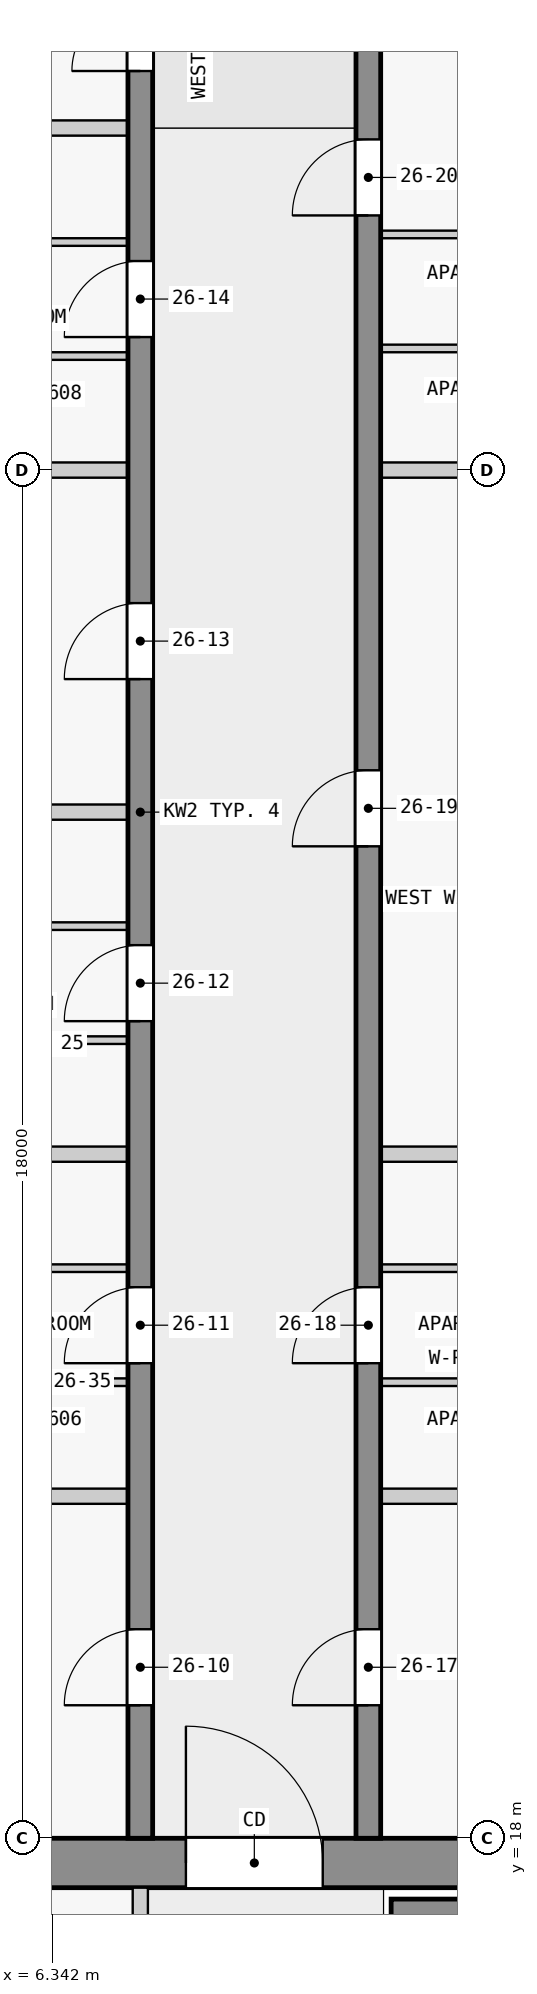
"""IFC4 building model, lengths in metres.
Left out: names, types, materials, properties, quantities, classifications, styles, units other than length and angle.
Written with IfcOpenShell. Run it as: python <this file> out.ifc"""

import sys

from ifc_helpers import new_model, si_unit, direction, frame, frame_2d, origin, place, context, subcontext, project, spatial, rectangle, extrude, element, fill, save


model = new_model("IFC4")
c1 = context("Model", 3, precision=1e-05, world=origin(), true_north=direction((0.0, 1.0)))
c2 = subcontext(c1, "Body", "Model", "MODEL_VIEW")
j1 = project(units=[si_unit("LENGTHUNIT", "METRE"), si_unit("PLANEANGLEUNIT", "RADIAN")], contexts=[c1])
p1 = place(None, origin())
s1 = spatial("IfcSite", under=j1, at=p1, CompositionType="ELEMENT")
p2 = place(p1, origin())
s2 = spatial("IfcBuilding", under=s1, at=p2, CompositionType="ELEMENT")
p3 = place(p2, frame((0.0, 0.0, 102.8)))
s3 = spatial("IfcBuildingStorey", under=s2, at=p3, CompositionType="ELEMENT", Elevation=102.8)
p4 = place(p3, frame((1.65, 17.675, 0.0), z_axis=(0.0, 0.0, 1.0), x_axis=(1.0, 0.0, 0.0)))
e1 = element("IfcWall", 1, at=p4, inside=s3, PredefinedType="SHEAR", context=c2, shape_type="SweptSolid", body=[
    extrude(rectangle(XDim=20.85, YDim=0.65, at=frame_2d((10.425, 0.0))), origin(), (0.0, 0.0, 1.0), 3.25),
])
p5 = place(p4, frame((6.45, 0.0, 0.0)))
e2 = element("IfcOpeningElement", 2, at=p5, cuts=e1, PredefinedType="OPENING", context=c2, shape_type="SweptSolid", body=[
    extrude(rectangle(XDim=1.8, YDim=2.1, at=frame_2d((0.9, 1.05))), frame((0.0, 0.335, 0.0), z_axis=(0.0, -1.0, 0.0), x_axis=(1.0, 0.0, 0.0)), (0.0, 0.0, 1.0), 0.67),
])
p6 = place(p3, frame((10.8, 17.05, 0.0), z_axis=(0.0, 0.0, 1.0), x_axis=(1.0, 0.0, 0.0)))
e3 = element("IfcWall", 3, at=p6, inside=s3, PredefinedType="SHEAR", context=c2, shape_type="SweptSolid", body=[
    extrude(rectangle(XDim=7.8, YDim=0.3, at=frame_2d((3.9, 0.0))), origin(), (0.0, 0.0, 1.0), 3.25),
])
p7 = place(p3, frame((7.5, 18.0, 0.0), z_axis=(0.0, 0.0, 1.0), x_axis=(0.0, 1.0, 0.0)))
e4 = element("IfcWall", 4, at=p7, inside=s3, PredefinedType="SHEAR", context=c2, shape_type="SweptSolid", body=[
    extrude(rectangle(XDim=27.0, YDim=0.325, at=frame_2d((13.5, 0.0))), origin(), (0.0, 0.0, 1.0), 3.25),
])
p8 = place(p7, frame((1.75, 0.0, 0.0)))
e5 = element("IfcOpeningElement", 5, at=p8, cuts=e4, PredefinedType="OPENING", context=c2, shape_type="SweptSolid", body=[
    extrude(rectangle(XDim=1.0, YDim=2.1, at=frame_2d((0.5, 1.05))), frame((0.0, 0.172, 0.0), z_axis=(0.0, -1.0, 0.0), x_axis=(1.0, 0.0, 0.0)), (0.0, 0.0, 1.0), 0.345),
])
p9 = place(p7, frame((6.25, 0.0, 0.0)))
e6 = element("IfcOpeningElement", 6, at=p9, cuts=e4, PredefinedType="OPENING", context=c2, shape_type="SweptSolid", body=[
    extrude(rectangle(XDim=1.0, YDim=2.1, at=frame_2d((0.5, 1.05))), frame((0.0, 0.172, 0.0), z_axis=(0.0, -1.0, 0.0), x_axis=(1.0, 0.0, 0.0)), (0.0, 0.0, 1.0), 0.345),
])
p10 = place(p7, frame((10.75, 0.0, 0.0)))
e7 = element("IfcOpeningElement", 7, at=p10, cuts=e4, PredefinedType="OPENING", context=c2, shape_type="SweptSolid", body=[
    extrude(rectangle(XDim=1.0, YDim=2.1, at=frame_2d((0.5, 1.05))), frame((0.0, 0.172, 0.0), z_axis=(0.0, -1.0, 0.0), x_axis=(1.0, 0.0, 0.0)), (0.0, 0.0, 1.0), 0.345),
])
p11 = place(p7, frame((15.25, 0.0, 0.0)))
e8 = element("IfcOpeningElement", 8, at=p11, cuts=e4, PredefinedType="OPENING", context=c2, shape_type="SweptSolid", body=[
    extrude(rectangle(XDim=1.0, YDim=2.1, at=frame_2d((0.5, 1.05))), frame((0.0, 0.172, 0.0), z_axis=(0.0, -1.0, 0.0), x_axis=(1.0, 0.0, 0.0)), (0.0, 0.0, 1.0), 0.345),
])
p12 = place(p7, frame((19.75, 0.0, 0.0)))
e9 = element("IfcOpeningElement", 9, at=p12, cuts=e4, PredefinedType="OPENING", context=c2, shape_type="SweptSolid", body=[
    extrude(rectangle(XDim=1.0, YDim=2.1, at=frame_2d((0.5, 1.05))), frame((0.0, 0.172, 0.0), z_axis=(0.0, -1.0, 0.0), x_axis=(1.0, 0.0, 0.0)), (0.0, 0.0, 1.0), 0.345),
])
p13 = place(p7, frame((23.25, 0.0, 0.0)))
e10 = element("IfcOpeningElement", 10, at=p13, cuts=e4, PredefinedType="OPENING", context=c2, shape_type="SweptSolid", body=[
    extrude(rectangle(XDim=0.9, YDim=2.1, at=frame_2d((0.45, 1.05))), frame((0.0, 0.172, 0.0), z_axis=(0.0, -1.0, 0.0), x_axis=(1.0, 0.0, 0.0)), (0.0, 0.0, 1.0), 0.345),
])
p14 = place(p7, frame((25.45, 0.0, 0.0)))
e11 = element("IfcOpeningElement", 11, at=p14, cuts=e4, PredefinedType="OPENING", context=c2, shape_type="SweptSolid", body=[
    extrude(rectangle(XDim=1.0, YDim=2.1, at=frame_2d((0.5, 1.05))), frame((0.0, 0.172, 0.0), z_axis=(0.0, -1.0, 0.0), x_axis=(1.0, 0.0, 0.0)), (0.0, 0.0, 1.0), 0.345),
])
p15 = place(p3, frame((10.5, 18.0, 0.0), z_axis=(0.0, 0.0, 1.0), x_axis=(0.0, 1.0, 0.0)))
e12 = element("IfcWall", 12, at=p15, inside=s3, PredefinedType="SHEAR", context=c2, shape_type="SweptSolid", body=[
    extrude(rectangle(XDim=27.0, YDim=0.325, at=frame_2d((13.5, 0.0))), origin(), (0.0, 0.0, 1.0), 3.25),
])
p16 = place(p15, frame((1.75, 0.0, 0.0)))
e13 = element("IfcOpeningElement", 13, at=p16, cuts=e12, PredefinedType="OPENING", context=c2, shape_type="SweptSolid", body=[
    extrude(rectangle(XDim=1.0, YDim=2.1, at=frame_2d((0.5, 1.05))), frame((0.0, 0.172, 0.0), z_axis=(0.0, -1.0, 0.0), x_axis=(1.0, 0.0, 0.0)), (0.0, 0.0, 1.0), 0.345),
])
p17 = place(p15, frame((6.25, 0.0, 0.0)))
e14 = element("IfcOpeningElement", 14, at=p17, cuts=e12, PredefinedType="OPENING", context=c2, shape_type="SweptSolid", body=[
    extrude(rectangle(XDim=1.0, YDim=2.1, at=frame_2d((0.5, 1.05))), frame((0.0, 0.172, 0.0), z_axis=(0.0, -1.0, 0.0), x_axis=(1.0, 0.0, 0.0)), (0.0, 0.0, 1.0), 0.345),
])
p18 = place(p15, frame((13.05, 0.0, 0.0)))
e15 = element("IfcOpeningElement", 15, at=p18, cuts=e12, PredefinedType="OPENING", context=c2, shape_type="SweptSolid", body=[
    extrude(rectangle(XDim=1.0, YDim=2.1, at=frame_2d((0.5, 1.05))), frame((0.0, 0.172, 0.0), z_axis=(0.0, -1.0, 0.0), x_axis=(1.0, 0.0, 0.0)), (0.0, 0.0, 1.0), 0.345),
])
p19 = place(p15, frame((21.35, 0.0, 0.0)))
e16 = element("IfcOpeningElement", 16, at=p19, cuts=e12, PredefinedType="OPENING", context=c2, shape_type="SweptSolid", body=[
    extrude(rectangle(XDim=1.0, YDim=2.1, at=frame_2d((0.5, 1.05))), frame((0.0, 0.172, 0.0), z_axis=(0.0, -1.0, 0.0), x_axis=(1.0, 0.0, 0.0)), (0.0, 0.0, 1.0), 0.345),
])
p20 = place(p3, frame((7.5, 10.1, 0.0), z_axis=(0.0, 0.0, 1.0), x_axis=(0.0, 1.0, 0.0)))
e17 = element("IfcWall", 17, at=p20, inside=s3, PredefinedType="PARTITIONING", context=c2, shape_type="SweptSolid", body=[
    extrude(rectangle(XDim=7.25, YDim=0.2, at=frame_2d((3.625, 0.0))), origin(), (0.0, 0.0, 1.0), 3.25),
])
p21 = place(p20, frame((0.775, 0.0, 0.0)))
e18 = element("IfcOpeningElement", 18, at=p21, cuts=e17, PredefinedType="OPENING", context=c2, shape_type="SweptSolid", body=[
    extrude(rectangle(XDim=0.9, YDim=2.1, at=frame_2d((0.45, 1.05))), frame((0.0, 0.11, 0.0), z_axis=(0.0, -1.0, 0.0), x_axis=(1.0, 0.0, 0.0)), (0.0, 0.0, 1.0), 0.22),
])
p22 = place(p20, frame((3.225, 0.0, 0.0)))
e19 = element("IfcOpeningElement", 19, at=p22, cuts=e17, PredefinedType="OPENING", context=c2, shape_type="SweptSolid", body=[
    extrude(rectangle(XDim=0.9, YDim=2.1, at=frame_2d((0.45, 1.05))), frame((0.0, 0.11, 0.0), z_axis=(0.0, -1.0, 0.0), x_axis=(1.0, 0.0, 0.0)), (0.0, 0.0, 1.0), 0.22),
])
p23 = place(p20, frame((5.25, 0.0, 0.0)))
e20 = element("IfcOpeningElement", 20, at=p23, cuts=e17, PredefinedType="OPENING", context=c2, shape_type="SweptSolid", body=[
    extrude(rectangle(XDim=0.9, YDim=2.1, at=frame_2d((0.45, 1.05))), frame((0.0, 0.11, 0.0), z_axis=(0.0, -1.0, 0.0), x_axis=(1.0, 0.0, 0.0)), (0.0, 0.0, 1.0), 0.22),
])
for number, where, z_axis, x_axis in (
    (21, (7.337, 22.5, 0.0), (0.0, 0.0, 1.0), (-1.0, 0.0, 0.0)),
    (22, (17.85, 22.5, 0.0), (0.0, 0.0, 1.0), (-1.0, 0.0, 0.0)),
):
    element("IfcWall", number, at=place(p3, frame(where, z_axis=z_axis, x_axis=x_axis)), inside=s3, PredefinedType="PARTITIONING", context=c2, shape_type="SweptSolid", body=[
        extrude(rectangle(XDim=7.188, YDim=0.2, at=frame_2d((3.594, 0.0))), origin(), (0.0, 0.0, 1.0), 3.25),
    ])
p24 = place(p3, frame((7.337, 24.0, 0.0), z_axis=(0.0, 0.0, 1.0), x_axis=(-1.0, 0.0, 0.0)))
e23 = element("IfcWall", 23, at=p24, inside=s3, PredefinedType="PARTITIONING", context=c2, shape_type="SweptSolid", body=[
    extrude(rectangle(XDim=3.4, YDim=0.1, at=frame_2d((1.7, 0.0))), origin(), (0.0, 0.0, 1.0), 3.25),
])
p25 = place(p24, frame((1.25, 0.0, 0.0)))
e24 = element("IfcOpeningElement", 24, at=p25, cuts=e23, PredefinedType="OPENING", context=c2, shape_type="SweptSolid", body=[
    extrude(rectangle(XDim=0.9, YDim=2.1, at=frame_2d((0.45, 1.05))), frame((0.0, 0.06, 0.0), z_axis=(0.0, -1.0, 0.0), x_axis=(1.0, 0.0, 0.0)), (0.0, 0.0, 1.0), 0.12),
])
p26 = place(p3, frame((14.062, 24.0, 0.0), z_axis=(0.0, 0.0, 1.0), x_axis=(-1.0, 0.0, 0.0)))
e25 = element("IfcWall", 25, at=p26, inside=s3, PredefinedType="PARTITIONING", context=c2, shape_type="SweptSolid", body=[
    extrude(rectangle(XDim=3.4, YDim=0.1, at=frame_2d((1.7, 0.0))), origin(), (0.0, 0.0, 1.0), 3.25),
])
p27 = place(p26, frame((1.25, 0.0, 0.0)))
e26 = element("IfcOpeningElement", 26, at=p27, cuts=e25, PredefinedType="OPENING", context=c2, shape_type="SweptSolid", body=[
    extrude(rectangle(XDim=0.9, YDim=2.1, at=frame_2d((0.45, 1.05))), frame((0.0, 0.06, 0.0), z_axis=(0.0, -1.0, 0.0), x_axis=(1.0, 0.0, 0.0)), (0.0, 0.0, 1.0), 0.12),
])
p28 = place(p3, frame((3.938, 25.5, 0.0), z_axis=(0.0, 0.0, 1.0), x_axis=(1.0, 0.0, 0.0)))
e27 = element("IfcWall", 27, at=p28, inside=s3, PredefinedType="PARTITIONING", context=c2, shape_type="SweptSolid", body=[
    extrude(rectangle(XDim=3.4, YDim=0.1, at=frame_2d((1.7, 0.0))), origin(), (0.0, 0.0, 1.0), 3.25),
])
p29 = place(p28, frame((1.25, 0.0, 0.0)))
e28 = element("IfcOpeningElement", 28, at=p29, cuts=e27, PredefinedType="OPENING", context=c2, shape_type="SweptSolid", body=[
    extrude(rectangle(XDim=0.9, YDim=2.1, at=frame_2d((0.45, 1.05))), frame((0.0, 0.06, 0.0), z_axis=(0.0, -1.0, 0.0), x_axis=(1.0, 0.0, 0.0)), (0.0, 0.0, 1.0), 0.12),
])
p30 = place(p3, frame((10.663, 25.5, 0.0), z_axis=(0.0, 0.0, 1.0), x_axis=(1.0, 0.0, 0.0)))
e29 = element("IfcWall", 29, at=p30, inside=s3, PredefinedType="PARTITIONING", context=c2, shape_type="SweptSolid", body=[
    extrude(rectangle(XDim=3.4, YDim=0.1, at=frame_2d((1.7, 0.0))), origin(), (0.0, 0.0, 1.0), 3.25),
])
p31 = place(p30, frame((1.25, 0.0, 0.0)))
e30 = element("IfcOpeningElement", 30, at=p31, cuts=e29, PredefinedType="OPENING", context=c2, shape_type="SweptSolid", body=[
    extrude(rectangle(XDim=0.9, YDim=2.1, at=frame_2d((0.45, 1.05))), frame((0.0, 0.06, 0.0), z_axis=(0.0, -1.0, 0.0), x_axis=(1.0, 0.0, 0.0)), (0.0, 0.0, 1.0), 0.12),
])
for number, where, z_axis, x_axis in (
    (31, (7.337, 27.0, 0.0), (0.0, 0.0, 1.0), (-1.0, 0.0, 0.0)),
    (32, (13.962, 27.0, 0.0), (0.0, 0.0, 1.0), (-1.0, 0.0, 0.0)),
):
    element("IfcWall", number, at=place(p3, frame(where, z_axis=z_axis, x_axis=x_axis)), inside=s3, PredefinedType="PARTITIONING", context=c2, shape_type="SweptSolid", body=[
        extrude(rectangle(XDim=3.3, YDim=0.2, at=frame_2d((1.65, 0.0))), origin(), (0.0, 0.0, 1.0), 3.25),
    ])
p32 = place(p3, frame((7.337, 28.5, 0.0), z_axis=(0.0, 0.0, 1.0), x_axis=(-1.0, 0.0, 0.0)))
e33 = element("IfcWall", 33, at=p32, inside=s3, PredefinedType="PARTITIONING", context=c2, shape_type="SweptSolid", body=[
    extrude(rectangle(XDim=3.4, YDim=0.1, at=frame_2d((1.7, 0.0))), origin(), (0.0, 0.0, 1.0), 3.25),
])
p33 = place(p32, frame((1.25, 0.0, 0.0)))
e34 = element("IfcOpeningElement", 34, at=p33, cuts=e33, PredefinedType="OPENING", context=c2, shape_type="SweptSolid", body=[
    extrude(rectangle(XDim=0.9, YDim=2.1, at=frame_2d((0.45, 1.05))), frame((0.0, 0.06, 0.0), z_axis=(0.0, -1.0, 0.0), x_axis=(1.0, 0.0, 0.0)), (0.0, 0.0, 1.0), 0.12),
])
p34 = place(p3, frame((3.938, 30.0, 0.0), z_axis=(0.0, 0.0, 1.0), x_axis=(1.0, 0.0, 0.0)))
e35 = element("IfcWall", 35, at=p34, inside=s3, PredefinedType="PARTITIONING", context=c2, shape_type="SweptSolid", body=[
    extrude(rectangle(XDim=3.4, YDim=0.1, at=frame_2d((1.7, 0.0))), origin(), (0.0, 0.0, 1.0), 3.25),
])
p35 = place(p34, frame((1.25, 0.0, 0.0)))
e36 = element("IfcOpeningElement", 36, at=p35, cuts=e35, PredefinedType="OPENING", context=c2, shape_type="SweptSolid", body=[
    extrude(rectangle(XDim=0.9, YDim=2.1, at=frame_2d((0.45, 1.05))), frame((0.0, 0.06, 0.0), z_axis=(0.0, -1.0, 0.0), x_axis=(1.0, 0.0, 0.0)), (0.0, 0.0, 1.0), 0.12),
])
p36 = place(p3, frame((7.337, 31.5, 0.0), z_axis=(0.0, 0.0, 1.0), x_axis=(-1.0, 0.0, 0.0)))
e37 = element("IfcWall", 37, at=p36, inside=s3, PredefinedType="PARTITIONING", context=c2, shape_type="SweptSolid", body=[
    extrude(rectangle(XDim=3.3, YDim=0.2, at=frame_2d((1.65, 0.0))), origin(), (0.0, 0.0, 1.0), 3.25),
])
for number, where, z_axis, x_axis in (
    (38, (7.337, 36.0, 0.0), (0.0, 0.0, 1.0), (-1.0, 0.0, 0.0)),
    (39, (16.6, 36.0, 0.0), (0.0, 0.0, 1.0), (-1.0, 0.0, 0.0)),
):
    element("IfcWall", number, at=place(p3, frame(where, z_axis=z_axis, x_axis=x_axis)), inside=s3, PredefinedType="PARTITIONING", context=c2, shape_type="SweptSolid", body=[
        extrude(rectangle(XDim=5.938, YDim=0.2, at=frame_2d((2.969, 0.0))), origin(), (0.0, 0.0, 1.0), 3.25),
    ])
p37 = place(p3, frame((7.337, 37.5, 0.0), z_axis=(0.0, 0.0, 1.0), x_axis=(-1.0, 0.0, 0.0)))
e40 = element("IfcWall", 40, at=p37, inside=s3, PredefinedType="PARTITIONING", context=c2, shape_type="SweptSolid", body=[
    extrude(rectangle(XDim=3.4, YDim=0.1, at=frame_2d((1.7, 0.0))), origin(), (0.0, 0.0, 1.0), 3.25),
])
p38 = place(p37, frame((1.25, 0.0, 0.0)))
e41 = element("IfcOpeningElement", 41, at=p38, cuts=e40, PredefinedType="OPENING", context=c2, shape_type="SweptSolid", body=[
    extrude(rectangle(XDim=0.9, YDim=2.1, at=frame_2d((0.45, 1.05))), frame((0.0, 0.06, 0.0), z_axis=(0.0, -1.0, 0.0), x_axis=(1.0, 0.0, 0.0)), (0.0, 0.0, 1.0), 0.12),
])
p39 = place(p3, frame((14.062, 37.6, 0.0), z_axis=(0.0, 0.0, 1.0), x_axis=(-1.0, 0.0, 0.0)))
e42 = element("IfcWall", 42, at=p39, inside=s3, PredefinedType="PARTITIONING", context=c2, shape_type="SweptSolid", body=[
    extrude(rectangle(XDim=3.4, YDim=0.1, at=frame_2d((1.7, 0.0))), origin(), (0.0, 0.0, 1.0), 3.25),
])
p40 = place(p3, frame((3.938, 39.0, 0.0), z_axis=(0.0, 0.0, 1.0), x_axis=(1.0, 0.0, 0.0)))
e43 = element("IfcWall", 43, at=p40, inside=s3, PredefinedType="PARTITIONING", context=c2, shape_type="SweptSolid", body=[
    extrude(rectangle(XDim=3.4, YDim=0.1, at=frame_2d((1.7, 0.0))), origin(), (0.0, 0.0, 1.0), 3.25),
])
p41 = place(p40, frame((1.25, 0.0, 0.0)))
e44 = element("IfcOpeningElement", 44, at=p41, cuts=e43, PredefinedType="OPENING", context=c2, shape_type="SweptSolid", body=[
    extrude(rectangle(XDim=0.9, YDim=2.1, at=frame_2d((0.45, 1.05))), frame((0.0, 0.06, 0.0), z_axis=(0.0, -1.0, 0.0), x_axis=(1.0, 0.0, 0.0)), (0.0, 0.0, 1.0), 0.12),
])
p42 = place(p3, frame((14.062, 39.1, 0.0), z_axis=(0.0, 0.0, 1.0), x_axis=(-1.0, 0.0, 0.0)))
e45 = element("IfcWall", 45, at=p42, inside=s3, PredefinedType="PARTITIONING", context=c2, shape_type="SweptSolid", body=[
    extrude(rectangle(XDim=3.4, YDim=0.1, at=frame_2d((1.7, 0.0))), origin(), (0.0, 0.0, 1.0), 3.25),
])
p43 = place(p42, frame((1.25, 0.0, 0.0)))
e46 = element("IfcOpeningElement", 46, at=p43, cuts=e45, PredefinedType="OPENING", context=c2, shape_type="SweptSolid", body=[
    extrude(rectangle(XDim=0.9, YDim=2.1, at=frame_2d((0.45, 1.05))), frame((0.0, 0.06, 0.0), z_axis=(0.0, -1.0, 0.0), x_axis=(1.0, 0.0, 0.0)), (0.0, 0.0, 1.0), 0.12),
])
p44 = place(p3, frame((7.337, 40.5, 0.0), z_axis=(0.0, 0.0, 1.0), x_axis=(-1.0, 0.0, 0.0)))
e47 = element("IfcWall", 47, at=p44, inside=s3, PredefinedType="PARTITIONING", context=c2, shape_type="SweptSolid", body=[
    extrude(rectangle(XDim=3.3, YDim=0.2, at=frame_2d((1.65, 0.0))), origin(), (0.0, 0.0, 1.0), 3.25),
])
p45 = place(p5, origin())
e48 = element("IfcDoor", 48, at=p45, inside=s3, OperationType="DOUBLE_DOOR_SINGLE_SWING", PredefinedType="DOOR", context=c2, shape_type="SweptSolid", body=[
    extrude(rectangle(XDim=1.8, YDim=2.1, at=frame_2d((0.9, 1.05))), frame((0.0, 0.025, 0.0), z_axis=(0.0, -1.0, 0.0), x_axis=(1.0, 0.0, 0.0)), (0.0, 0.0, 1.0), 0.05),
])
fill(e2, e48)
p46 = place(p8, origin())
e49 = element("IfcDoor", 49, at=p46, inside=s3, OperationType="SINGLE_SWING_LEFT", PredefinedType="DOOR", context=c2, shape_type="SweptSolid", body=[
    extrude(rectangle(XDim=1.0, YDim=2.1, at=frame_2d((0.5, 1.05))), frame((0.0, 0.025, 0.0), z_axis=(0.0, -1.0, 0.0), x_axis=(1.0, 0.0, 0.0)), (0.0, 0.0, 1.0), 0.05),
])
fill(e5, e49)
p47 = place(p9, origin())
e50 = element("IfcDoor", 50, at=p47, inside=s3, OperationType="SINGLE_SWING_LEFT", PredefinedType="DOOR", context=c2, shape_type="SweptSolid", body=[
    extrude(rectangle(XDim=1.0, YDim=2.1, at=frame_2d((0.5, 1.05))), frame((0.0, 0.025, 0.0), z_axis=(0.0, -1.0, 0.0), x_axis=(1.0, 0.0, 0.0)), (0.0, 0.0, 1.0), 0.05),
])
fill(e6, e50)
p48 = place(p10, origin())
e51 = element("IfcDoor", 51, at=p48, inside=s3, OperationType="SINGLE_SWING_LEFT", PredefinedType="DOOR", context=c2, shape_type="SweptSolid", body=[
    extrude(rectangle(XDim=1.0, YDim=2.1, at=frame_2d((0.5, 1.05))), frame((0.0, 0.025, 0.0), z_axis=(0.0, -1.0, 0.0), x_axis=(1.0, 0.0, 0.0)), (0.0, 0.0, 1.0), 0.05),
])
fill(e7, e51)
p49 = place(p11, origin())
e52 = element("IfcDoor", 52, at=p49, inside=s3, OperationType="SINGLE_SWING_RIGHT", PredefinedType="DOOR", context=c2, shape_type="SweptSolid", body=[
    extrude(rectangle(XDim=1.0, YDim=2.1, at=frame_2d((0.5, 1.05))), frame((0.0, 0.025, 0.0), z_axis=(0.0, -1.0, 0.0), x_axis=(1.0, 0.0, 0.0)), (0.0, 0.0, 1.0), 0.05),
])
fill(e8, e52)
p50 = place(p12, origin())
e53 = element("IfcDoor", 53, at=p50, inside=s3, OperationType="SINGLE_SWING_RIGHT", PredefinedType="DOOR", context=c2, shape_type="SweptSolid", body=[
    extrude(rectangle(XDim=1.0, YDim=2.1, at=frame_2d((0.5, 1.05))), frame((0.0, 0.025, 0.0), z_axis=(0.0, -1.0, 0.0), x_axis=(1.0, 0.0, 0.0)), (0.0, 0.0, 1.0), 0.05),
])
fill(e9, e53)
p51 = place(p13, origin())
e54 = element("IfcDoor", 54, at=p51, inside=s3, OperationType="SINGLE_SWING_RIGHT", PredefinedType="DOOR", context=c2, shape_type="SweptSolid", body=[
    extrude(rectangle(XDim=0.9, YDim=2.1, at=frame_2d((0.45, 1.05))), frame((0.0, 0.025, 0.0), z_axis=(0.0, -1.0, 0.0), x_axis=(1.0, 0.0, 0.0)), (0.0, 0.0, 1.0), 0.05),
])
fill(e10, e54)
p52 = place(p16, origin())
e55 = element("IfcDoor", 55, at=p52, inside=s3, OperationType="SINGLE_SWING_LEFT", PredefinedType="DOOR", context=c2, shape_type="SweptSolid", body=[
    extrude(rectangle(XDim=1.0, YDim=2.1, at=frame_2d((0.5, 1.05))), frame((0.0, 0.025, 0.0), z_axis=(0.0, -1.0, 0.0), x_axis=(1.0, 0.0, 0.0)), (0.0, 0.0, 1.0), 0.05),
])
fill(e13, e55)
p53 = place(p17, origin())
e56 = element("IfcDoor", 56, at=p53, inside=s3, OperationType="SINGLE_SWING_LEFT", PredefinedType="DOOR", context=c2, shape_type="SweptSolid", body=[
    extrude(rectangle(XDim=1.0, YDim=2.1, at=frame_2d((0.5, 1.05))), frame((0.0, 0.025, 0.0), z_axis=(0.0, -1.0, 0.0), x_axis=(1.0, 0.0, 0.0)), (0.0, 0.0, 1.0), 0.05),
])
fill(e14, e56)
p54 = place(p18, origin())
e57 = element("IfcDoor", 57, at=p54, inside=s3, OperationType="SINGLE_SWING_RIGHT", PredefinedType="DOOR", context=c2, shape_type="SweptSolid", body=[
    extrude(rectangle(XDim=1.0, YDim=2.1, at=frame_2d((0.5, 1.05))), frame((0.0, 0.025, 0.0), z_axis=(0.0, -1.0, 0.0), x_axis=(1.0, 0.0, 0.0)), (0.0, 0.0, 1.0), 0.05),
])
fill(e15, e57)
p55 = place(p19, origin())
e58 = element("IfcDoor", 58, at=p55, inside=s3, OperationType="SINGLE_SWING_RIGHT", PredefinedType="DOOR", context=c2, shape_type="SweptSolid", body=[
    extrude(rectangle(XDim=1.0, YDim=2.1, at=frame_2d((0.5, 1.05))), frame((0.0, 0.025, 0.0), z_axis=(0.0, -1.0, 0.0), x_axis=(1.0, 0.0, 0.0)), (0.0, 0.0, 1.0), 0.05),
])
fill(e16, e58)
save(model, sys.argv[1])
